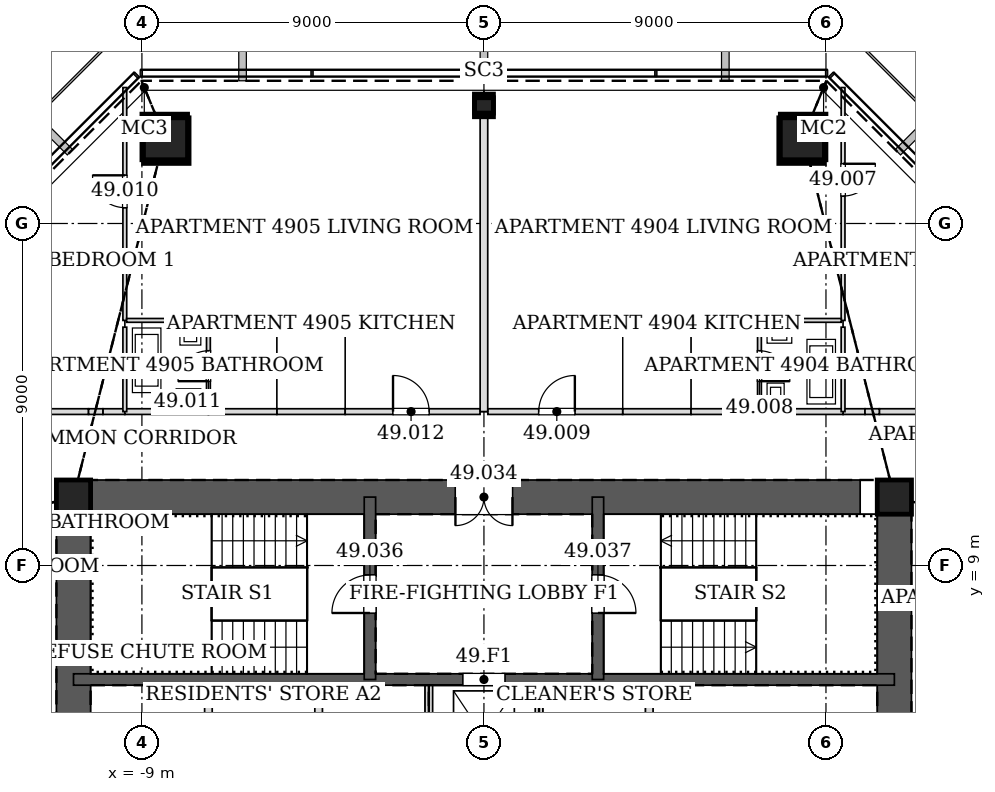
"""IFC4 building model, lengths in metres.
Left out: names, types, materials, properties, quantities, classifications, styles, units other than length and angle.
Written with IfcOpenShell. Run it as: python <this file> out.ifc"""

import sys

from ifc_helpers import new_model, si_unit, direction, frame, frame_2d, origin, origin_2d, place, context, subcontext, project, spatial, rectangle, hollow_rectangle, extrude, element, fill, save


model = new_model("IFC4")
c1 = context("Model", 3, precision=1e-05, world=origin(), true_north=direction((0.0, 1.0)))
c2 = subcontext(c1, "Body", "Model", "MODEL_VIEW")
j1 = project(units=[si_unit("LENGTHUNIT", "METRE"), si_unit("PLANEANGLEUNIT", "RADIAN")], contexts=[c1])
p1 = place(None, origin())
s1 = spatial("IfcSite", under=j1, at=p1, CompositionType="ELEMENT")
p2 = place(p1, origin())
s2 = spatial("IfcBuilding", under=s1, at=p2, CompositionType="ELEMENT")
p3 = place(p2, frame((0.0, 0.0, 214.2)))
s3 = spatial("IfcBuildingStorey", under=s2, at=p3, CompositionType="ELEMENT", Elevation=214.2)
for number, where, z_axis, x_axis in (
    (1, (8.399, 20.277, 0.0), (-0.012, -0.028, 1.0), (0.923, -0.384, 0.0)),
    (2, (-8.399, 20.277, 0.0), (0.012, -0.028, 1.0), (0.923, 0.384, 0.0)),
):
    element("IfcColumn", number, at=place(p3, frame(where, z_axis=z_axis, x_axis=x_axis)), inside=s3, PredefinedType="COLUMN", context=c2, shape_type="SweptSolid", body=[
        extrude(hollow_rectangle(XDim=1.2, YDim=1.2, WallThickness=0.055, at=origin_2d()), origin(), (0.0, 0.0, 1.0), 3.402),
    ])
p4 = place(p3, frame((0.0, 21.155, 0.0), z_axis=(0.0, -0.028279056982, 0.999600067495), x_axis=(1.0, 0.0, 0.0)))
e3 = element("IfcColumn", 3, at=p4, inside=s3, PredefinedType="COLUMN", context=c2, shape_type="SweptSolid", body=[
    extrude(hollow_rectangle(XDim=0.5, YDim=0.5, WallThickness=0.025, at=origin_2d()), origin(), (0.0, 0.0, 1.0), 3.402),
])
for number, where, z_axis, x_axis in (
    (4, (10.8, 10.8, 0.0), (0.0, 0.0, 1.0), (1.0, 0.0, 0.0)),
    (5, (-10.8, 10.8, 0.0), (0.0, 0.0, 1.0), (1.0, 0.0, 0.0)),
):
    element("IfcColumn", number, at=place(p3, frame(where, z_axis=z_axis, x_axis=x_axis)), inside=s3, PredefinedType="COLUMN", context=c2, shape_type="SweptSolid", body=[
        extrude(hollow_rectangle(XDim=0.9, YDim=0.9, WallThickness=0.05, at=origin_2d()), origin(), (0.0, 0.0, 1.0), 3.4),
    ])
p5 = place(p3, frame((10.8, -10.8, 0.0), z_axis=(0.0, 0.0, 1.0), x_axis=(0.0, 1.0, 0.0)))
e6 = element("IfcWall", 6, at=p5, inside=s3, PredefinedType="SOLIDWALL", context=c2, shape_type="SweptSolid", body=[
    extrude(rectangle(XDim=21.6, YDim=0.9, at=frame_2d((10.8, 0.0))), origin(), (0.0, 0.0, 1.0), 3.4),
])
p6 = place(p5, frame((11.7, 0.0, 0.0)))
e7 = element("IfcOpeningElement", 7, at=p6, cuts=e6, PredefinedType="OPENING", context=c2, shape_type="SweptSolid", body=[
    extrude(rectangle(XDim=1.2, YDim=2.1, at=frame_2d((0.6, 1.05))), frame((0.0, 0.46, 0.0), z_axis=(0.0, -1.0, 0.0), x_axis=(1.0, 0.0, 0.0)), (0.0, 0.0, 1.0), 0.92),
])
p7 = place(p5, frame((8.7, 0.0, 0.0)))
e8 = element("IfcOpeningElement", 8, at=p7, cuts=e6, PredefinedType="OPENING", context=c2, shape_type="SweptSolid", body=[
    extrude(rectangle(XDim=1.2, YDim=2.1, at=frame_2d((0.6, 1.05))), frame((0.0, 0.46, 0.0), z_axis=(0.0, -1.0, 0.0), x_axis=(1.0, 0.0, 0.0)), (0.0, 0.0, 1.0), 0.92),
])
p8 = place(p3, frame((10.8, 10.8, 0.0), z_axis=(0.0, 0.0, 1.0), x_axis=(-1.0, 0.0, 0.0)))
e9 = element("IfcWall", 9, at=p8, inside=s3, PredefinedType="SOLIDWALL", context=c2, shape_type="SweptSolid", body=[
    extrude(rectangle(XDim=21.6, YDim=0.9, at=frame_2d((10.8, 0.0))), origin(), (0.0, 0.0, 1.0), 3.4),
])
p9 = place(p8, frame((10.05, 0.0, 0.0)))
e10 = element("IfcOpeningElement", 10, at=p9, cuts=e9, PredefinedType="OPENING", context=c2, shape_type="SweptSolid", body=[
    extrude(rectangle(XDim=1.5, YDim=2.1, at=frame_2d((0.75, 1.05))), frame((0.0, 0.46, 0.0), z_axis=(0.0, -1.0, 0.0), x_axis=(1.0, 0.0, 0.0)), (0.0, 0.0, 1.0), 0.92),
])
p10 = place(p3, frame((-10.8, 10.8, 0.0), z_axis=(0.0, 0.0, 1.0), x_axis=(0.0, -1.0, 0.0)))
e11 = element("IfcWall", 11, at=p10, inside=s3, PredefinedType="SOLIDWALL", context=c2, shape_type="SweptSolid", body=[
    extrude(rectangle(XDim=21.6, YDim=0.9, at=frame_2d((10.8, 0.0))), origin(), (0.0, 0.0, 1.0), 3.4),
])
p11 = place(p10, frame((8.7, 0.0, 0.0)))
e12 = element("IfcOpeningElement", 12, at=p11, cuts=e11, PredefinedType="OPENING", context=c2, shape_type="SweptSolid", body=[
    extrude(rectangle(XDim=1.2, YDim=2.1, at=frame_2d((0.6, 1.05))), frame((0.0, 0.46, 0.0), z_axis=(0.0, -1.0, 0.0), x_axis=(1.0, 0.0, 0.0)), (0.0, 0.0, 1.0), 0.92),
])
p12 = place(p10, frame((11.7, 0.0, 0.0)))
e13 = element("IfcOpeningElement", 13, at=p12, cuts=e11, PredefinedType="OPENING", context=c2, shape_type="SweptSolid", body=[
    extrude(rectangle(XDim=1.2, YDim=2.1, at=frame_2d((0.6, 1.05))), frame((0.0, 0.46, 0.0), z_axis=(0.0, -1.0, 0.0), x_axis=(1.0, 0.0, 0.0)), (0.0, 0.0, 1.0), 0.92),
])
p13 = place(p3, frame((-10.8, 6.0, 0.0), z_axis=(0.0, 0.0, 1.0), x_axis=(1.0, 0.0, 0.0)))
e14 = element("IfcWall", 14, at=p13, inside=s3, PredefinedType="SOLIDWALL", context=c2, shape_type="SweptSolid", body=[
    extrude(rectangle(XDim=21.6, YDim=0.3, at=frame_2d((10.8, 0.0))), origin(), (0.0, 0.0, 1.0), 3.4),
])
p14 = place(p13, frame((10.25, 0.0, 0.0)))
e15 = element("IfcOpeningElement", 15, at=p14, cuts=e14, PredefinedType="OPENING", context=c2, shape_type="SweptSolid", body=[
    extrude(rectangle(XDim=1.1, YDim=2.1, at=frame_2d((0.55, 1.05))), frame((0.0, 0.16, 0.0), z_axis=(0.0, -1.0, 0.0), x_axis=(1.0, 0.0, 0.0)), (0.0, 0.0, 1.0), 0.32),
])
p15 = place(p3, frame((-3.0, 6.0, 0.0), z_axis=(0.0, 0.0, 1.0), x_axis=(0.0, 1.0, 0.0)))
e16 = element("IfcWall", 16, at=p15, inside=s3, PredefinedType="SOLIDWALL", context=c2, shape_type="SweptSolid", body=[
    extrude(rectangle(XDim=4.8, YDim=0.3, at=frame_2d((2.4, 0.0))), origin(), (0.0, 0.0, 1.0), 3.4),
])
p16 = place(p15, frame((1.75, 0.0, 0.0)))
e17 = element("IfcOpeningElement", 17, at=p16, cuts=e16, PredefinedType="OPENING", context=c2, shape_type="SweptSolid", body=[
    extrude(rectangle(XDim=1.0, YDim=2.1, at=frame_2d((0.5, 1.05))), frame((0.0, 0.16, 0.0), z_axis=(0.0, -1.0, 0.0), x_axis=(1.0, 0.0, 0.0)), (0.0, 0.0, 1.0), 0.32),
])
p17 = place(p3, frame((3.0, 6.0, 0.0), z_axis=(0.0, 0.0, 1.0), x_axis=(0.0, 1.0, 0.0)))
e18 = element("IfcWall", 18, at=p17, inside=s3, PredefinedType="SOLIDWALL", context=c2, shape_type="SweptSolid", body=[
    extrude(rectangle(XDim=4.8, YDim=0.3, at=frame_2d((2.4, 0.0))), origin(), (0.0, 0.0, 1.0), 3.4),
])
p18 = place(p17, frame((1.75, 0.0, 0.0)))
e19 = element("IfcOpeningElement", 19, at=p18, cuts=e18, PredefinedType="OPENING", context=c2, shape_type="SweptSolid", body=[
    extrude(rectangle(XDim=1.0, YDim=2.1, at=frame_2d((0.5, 1.05))), frame((0.0, 0.16, 0.0), z_axis=(0.0, -1.0, 0.0), x_axis=(1.0, 0.0, 0.0)), (0.0, 0.0, 1.0), 0.32),
])
p19 = place(p3, frame((13.05, 13.05, 0.0), z_axis=(0.0, 0.0, 1.0), x_axis=(-1.0, 0.0, 0.0)))
e20 = element("IfcWall", 20, at=p19, inside=s3, PredefinedType="PARTITIONING", context=c2, shape_type="SweptSolid", body=[
    extrude(rectangle(XDim=2.646, YDim=0.15, at=frame_2d((1.323, 0.0))), origin(), (0.0, 0.0, 1.0), 2.578),
])
p20 = place(p3, frame((10.027, 13.05, 0.0), z_axis=(0.0, 0.0, 1.0), x_axis=(-1.0, 0.0, 0.0)))
e21 = element("IfcWall", 21, at=p20, inside=s3, PredefinedType="PARTITIONING", context=c2, shape_type="SweptSolid", body=[
    extrude(rectangle(XDim=0.578, YDim=0.15, at=frame_2d((0.289, 0.0))), origin(), (0.0, 0.0, 1.0), 3.2),
])
p21 = place(p3, frame((10.404, 13.05, 0.0), z_axis=(0.0, 0.0, 1.0), x_axis=(-1.0, 0.0, 0.0)))
e22 = element("IfcWall", 22, at=p21, inside=s3, PredefinedType="PARTITIONING", context=c2, shape_type="SweptSolid", body=[
    extrude(rectangle(XDim=0.377, YDim=0.15, at=frame_2d((0.188, 0.0))), origin(), (0.0, 0.0, 1.0), 2.268),
])
p22 = place(p3, frame((9.451, 13.05, 0.0), z_axis=(0.0, 0.0, 1.0), x_axis=(-1.0, 0.0, 0.0)))
e23 = element("IfcWall", 23, at=p22, inside=s3, PredefinedType="PARTITIONING", context=c2, shape_type="SweptSolid", body=[
    extrude(rectangle(XDim=2.202, YDim=0.15, at=frame_2d((1.101, 0.0))), origin(), (0.0, 0.0, 1.0), 3.2),
])
p23 = place(p3, frame((5.451, 13.05, 0.0), z_axis=(0.0, 0.0, 1.0), x_axis=(-1.0, 0.0, 0.0)))
e24 = element("IfcWall", 24, at=p23, inside=s3, PredefinedType="PARTITIONING", context=c2, shape_type="SweptSolid", body=[
    extrude(rectangle(XDim=1.802, YDim=0.15, at=frame_2d((0.901, 0.0))), origin(), (0.0, 0.0, 1.0), 3.2),
])
p24 = place(p3, frame((3.651, 13.05, 0.0), z_axis=(0.0, 0.0, 1.0), x_axis=(-1.0, 0.0, 0.0)))
e25 = element("IfcWall", 25, at=p24, inside=s3, PredefinedType="PARTITIONING", context=c2, shape_type="SweptSolid", body=[
    extrude(rectangle(XDim=3.549, YDim=0.15, at=frame_2d((1.774, 0.0))), origin(), (0.0, 0.0, 1.0), 3.2),
])
p25 = place(p24, frame((1.259, 0.0, 0.0)))
e26 = element("IfcOpeningElement", 26, at=p25, cuts=e25, PredefinedType="OPENING", context=c2, shape_type="SweptSolid", body=[
    extrude(rectangle(XDim=0.95, YDim=2.1, at=frame_2d((0.475, 1.05))), frame((0.0, 0.085, 0.0), z_axis=(0.0, -1.0, 0.0), x_axis=(1.0, 0.0, 0.0)), (0.0, 0.0, 1.0), 0.17),
])
p26 = place(p3, frame((7.251, 13.05, 0.0), z_axis=(0.0, 0.0, 1.0), x_axis=(-1.0, 0.0, 0.0)))
e27 = element("IfcWall", 27, at=p26, inside=s3, PredefinedType="PARTITIONING", context=c2, shape_type="SweptSolid", body=[
    extrude(rectangle(XDim=1.802, YDim=0.15, at=frame_2d((0.901, 0.0))), origin(), (0.0, 0.0, 1.0), 3.2),
])
p27 = place(p3, frame((-9.449, 13.05, 0.0), z_axis=(0.0, 0.0, 1.0), x_axis=(-1.0, 0.0, 0.0)))
e28 = element("IfcWall", 28, at=p27, inside=s3, PredefinedType="PARTITIONING", context=c2, shape_type="SweptSolid", body=[
    extrude(rectangle(XDim=0.578, YDim=0.15, at=frame_2d((0.289, 0.0))), origin(), (0.0, 0.0, 1.0), 3.2),
])
p28 = place(p3, frame((-10.404, 13.05, 0.0), z_axis=(0.0, 0.0, 1.0), x_axis=(-1.0, 0.0, 0.0)))
e29 = element("IfcWall", 29, at=p28, inside=s3, PredefinedType="PARTITIONING", context=c2, shape_type="SweptSolid", body=[
    extrude(rectangle(XDim=2.646, YDim=0.15, at=frame_2d((1.323, 0.0))), origin(), (0.0, 0.0, 1.0), 2.578),
])
p29 = place(p3, frame((-10.027, 13.05, 0.0), z_axis=(0.0, 0.0, 1.0), x_axis=(-1.0, 0.0, 0.0)))
e30 = element("IfcWall", 30, at=p29, inside=s3, PredefinedType="PARTITIONING", context=c2, shape_type="SweptSolid", body=[
    extrude(rectangle(XDim=0.377, YDim=0.15, at=frame_2d((0.188, 0.0))), origin(), (0.0, 0.0, 1.0), 2.268),
])
p30 = place(p3, frame((-7.249, 13.05, 0.0), z_axis=(0.0, 0.0, 1.0), x_axis=(-1.0, 0.0, 0.0)))
e31 = element("IfcWall", 31, at=p30, inside=s3, PredefinedType="PARTITIONING", context=c2, shape_type="SweptSolid", body=[
    extrude(rectangle(XDim=2.202, YDim=0.15, at=frame_2d((1.101, 0.0))), origin(), (0.0, 0.0, 1.0), 3.2),
])
for number, where, z_axis, x_axis in (
    (32, (-3.649, 13.05, 0.0), (0.0, 0.0, 1.0), (-1.0, 0.0, 0.0)),
    (33, (-5.449, 13.05, 0.0), (0.0, 0.0, 1.0), (-1.0, 0.0, 0.0)),
):
    element("IfcWall", number, at=place(p3, frame(where, z_axis=z_axis, x_axis=x_axis)), inside=s3, PredefinedType="PARTITIONING", context=c2, shape_type="SweptSolid", body=[
        extrude(rectangle(XDim=1.802, YDim=0.15, at=frame_2d((0.901, 0.0))), origin(), (0.0, 0.0, 1.0), 3.2),
    ])
p31 = place(p3, frame((-0.102, 13.05, 0.0), z_axis=(0.0, 0.0, 1.0), x_axis=(-1.0, 0.0, 0.0)))
e34 = element("IfcWall", 34, at=p31, inside=s3, PredefinedType="PARTITIONING", context=c2, shape_type="SweptSolid", body=[
    extrude(rectangle(XDim=3.549, YDim=0.15, at=frame_2d((1.774, 0.0))), origin(), (0.0, 0.0, 1.0), 3.2),
])
p32 = place(p31, frame((1.34, 0.0, 0.0)))
e35 = element("IfcOpeningElement", 35, at=p32, cuts=e34, PredefinedType="OPENING", context=c2, shape_type="SweptSolid", body=[
    extrude(rectangle(XDim=0.95, YDim=2.1, at=frame_2d((0.475, 1.05))), frame((0.0, 0.085, 0.0), z_axis=(0.0, -1.0, 0.0), x_axis=(1.0, 0.0, 0.0)), (0.0, 0.0, 1.0), 0.17),
])
p33 = place(p3, frame((9.45, 15.271, 0.0), z_axis=(0.0, 0.0, 1.0), x_axis=(0.0, -1.0, 0.0)))
e36 = element("IfcWall", 36, at=p33, inside=s3, PredefinedType="PARTITIONING", context=c2, shape_type="SweptSolid", body=[
    extrude(rectangle(XDim=2.221, YDim=0.1, at=frame_2d((1.111, 0.0))), origin(), (0.0, 0.0, 1.0), 2.591),
])
p34 = place(p3, frame((9.45, 21.578, 0.0), z_axis=(0.0, 0.0, 1.0), x_axis=(0.0, -1.0, 0.0)))
e37 = element("IfcWall", 37, at=p34, inside=s3, PredefinedType="PARTITIONING", context=c2, shape_type="SweptSolid", body=[
    extrude(rectangle(XDim=4.855, YDim=0.1, at=frame_2d((2.428, 0.0))), origin(), (0.0, 0.0, 1.0), 2.784),
])
p35 = place(p34, frame((2.006, 0.0, 0.0)))
e38 = element("IfcOpeningElement", 38, at=p35, cuts=e37, PredefinedType="OPENING", context=c2, shape_type="SweptSolid", body=[
    extrude(rectangle(XDim=0.85, YDim=2.1, at=frame_2d((0.425, 1.05))), frame((0.0, 0.06, 0.0), z_axis=(0.0, -1.0, 0.0), x_axis=(1.0, 0.0, 0.0)), (0.0, 0.0, 1.0), 0.12),
])
p36 = place(p3, frame((9.45, 16.722, 0.0), z_axis=(0.0, 0.0, 1.0), x_axis=(0.0, -1.0, 0.0)))
e39 = element("IfcWall", 39, at=p36, inside=s3, PredefinedType="PARTITIONING", context=c2, shape_type="SweptSolid", body=[
    extrude(rectangle(XDim=1.273, YDim=0.1, at=frame_2d((0.637, 0.0))), origin(), (0.0, 0.0, 1.0), 2.268),
])
p37 = place(p3, frame((9.404, 15.45, 0.0), z_axis=(0.0, 0.0, 1.0), x_axis=(-1.0, 0.0, 0.0)))
e40 = element("IfcWall", 40, at=p37, inside=s3, PredefinedType="PARTITIONING", context=c2, shape_type="SweptSolid", body=[
    extrude(rectangle(XDim=2.154, YDim=0.1, at=frame_2d((1.077, 0.0))), origin(), (0.0, 0.0, 1.0), 3.2),
])
p38 = place(p3, frame((7.25, 15.45, 0.0), z_axis=(0.0, 0.0, 1.0), x_axis=(0.0, -1.0, 0.0)))
e41 = element("IfcWall", 41, at=p38, inside=s3, PredefinedType="PARTITIONING", context=c2, shape_type="SweptSolid", body=[
    extrude(rectangle(XDim=2.4, YDim=0.1, at=frame_2d((1.2, 0.0))), origin(), (0.0, 0.0, 1.0), 2.591),
])
p39 = place(p38, frame((0.8, 0.0, 0.0)))
e42 = element("IfcOpeningElement", 42, at=p39, cuts=e41, PredefinedType="OPENING", context=c2, shape_type="SweptSolid", body=[
    extrude(rectangle(XDim=0.8, YDim=2.1, at=frame_2d((0.4, 1.05))), frame((0.0, 0.06, 0.0), z_axis=(0.0, -1.0, 0.0), x_axis=(1.0, 0.0, 0.0)), (0.0, 0.0, 1.0), 0.12),
])
p40 = place(p3, frame((0.0, 20.79, 0.0), z_axis=(0.0, 0.0, 1.0), x_axis=(0.0, -1.0, 0.0)))
e43 = element("IfcWall", 43, at=p40, inside=s3, PredefinedType="PARTITIONING", context=c2, shape_type="SweptSolid", body=[
    extrude(rectangle(XDim=7.74, YDim=0.2, at=frame_2d((3.87, 0.0))), origin(), (0.0, 0.0, 1.0), 2.253),
])
p41 = place(p3, frame((-9.45, 13.05, 0.0), z_axis=(0.0, 0.0, 1.0), x_axis=(0.0, 1.0, 0.0)))
e44 = element("IfcWall", 44, at=p41, inside=s3, PredefinedType="PARTITIONING", context=c2, shape_type="SweptSolid", body=[
    extrude(rectangle(XDim=2.221, YDim=0.1, at=frame_2d((1.111, 0.0))), origin(), (0.0, 0.0, 1.0), 2.591),
])
p42 = place(p3, frame((-9.45, 16.722, 0.0), z_axis=(0.0, 0.0, 1.0), x_axis=(0.0, 1.0, 0.0)))
e45 = element("IfcWall", 45, at=p42, inside=s3, PredefinedType="PARTITIONING", context=c2, shape_type="SweptSolid", body=[
    extrude(rectangle(XDim=4.855, YDim=0.1, at=frame_2d((2.428, 0.0))), origin(), (0.0, 0.0, 1.0), 2.784),
])
p43 = place(p42, frame((1.695, 0.0, 0.0)))
e46 = element("IfcOpeningElement", 46, at=p43, cuts=e45, PredefinedType="OPENING", context=c2, shape_type="SweptSolid", body=[
    extrude(rectangle(XDim=0.85, YDim=2.1, at=frame_2d((0.425, 1.05))), frame((0.0, 0.06, 0.0), z_axis=(0.0, -1.0, 0.0), x_axis=(1.0, 0.0, 0.0)), (0.0, 0.0, 1.0), 0.12),
])
p44 = place(p3, frame((-9.45, 15.449, 0.0), z_axis=(0.0, 0.0, 1.0), x_axis=(0.0, 1.0, 0.0)))
e47 = element("IfcWall", 47, at=p44, inside=s3, PredefinedType="PARTITIONING", context=c2, shape_type="SweptSolid", body=[
    extrude(rectangle(XDim=1.273, YDim=0.1, at=frame_2d((0.637, 0.0))), origin(), (0.0, 0.0, 1.0), 2.268),
])
p45 = place(p3, frame((-7.25, 13.05, 0.0), z_axis=(0.0, 0.0, 1.0), x_axis=(0.0, 1.0, 0.0)))
e48 = element("IfcWall", 48, at=p45, inside=s3, PredefinedType="PARTITIONING", context=c2, shape_type="SweptSolid", body=[
    extrude(rectangle(XDim=2.4, YDim=0.1, at=frame_2d((1.2, 0.0))), origin(), (0.0, 0.0, 1.0), 2.591),
])
p46 = place(p45, frame((0.8, 0.0, 0.0)))
e49 = element("IfcOpeningElement", 49, at=p46, cuts=e48, PredefinedType="OPENING", context=c2, shape_type="SweptSolid", body=[
    extrude(rectangle(XDim=0.8, YDim=2.1, at=frame_2d((0.4, 1.05))), frame((0.0, 0.06, 0.0), z_axis=(0.0, -1.0, 0.0), x_axis=(1.0, 0.0, 0.0)), (0.0, 0.0, 1.0), 0.12),
])
p47 = place(p3, frame((-7.25, 15.45, 0.0), z_axis=(0.0, 0.0, 1.0), x_axis=(-1.0, 0.0, 0.0)))
e50 = element("IfcWall", 50, at=p47, inside=s3, PredefinedType="PARTITIONING", context=c2, shape_type="SweptSolid", body=[
    extrude(rectangle(XDim=2.154, YDim=0.1, at=frame_2d((1.077, 0.0))), origin(), (0.0, 0.0, 1.0), 3.2),
])
for number, where, z_axis, x_axis in (
    (51, (-7.25, 3.15, 0.0), (0.0, 0.0, 1.0), (0.0, 1.0, 0.0)),
    (52, (-4.35, 3.15, 0.0), (0.0, 0.0, 1.0), (0.0, 1.0, 0.0)),
    (53, (-1.45, 3.15, 0.0), (0.0, 0.0, 1.0), (0.0, 1.0, 0.0)),
    (54, (1.45, 3.15, 0.0), (0.0, 0.0, 1.0), (0.0, 1.0, 0.0)),
    (55, (4.35, 3.15, 0.0), (0.0, 0.0, 1.0), (0.0, 1.0, 0.0)),
):
    element("IfcWall", number, at=place(p3, frame(where, z_axis=z_axis, x_axis=x_axis)), inside=s3, PredefinedType="PARTITIONING", context=c2, shape_type="SweptSolid", body=[
        extrude(rectangle(XDim=2.7, YDim=0.2, at=frame_2d((1.35, 0.0))), origin(), (0.0, 0.0, 1.0), 3.2),
    ])
p48 = place(p35, origin())
e56 = element("IfcDoor", 56, at=p48, inside=s3, OperationType="SINGLE_SWING_LEFT", PredefinedType="DOOR", context=c2, shape_type="SweptSolid", body=[
    extrude(rectangle(XDim=0.85, YDim=2.1, at=frame_2d((0.425, 1.05))), frame((0.0, 0.025, 0.0), z_axis=(0.0, -1.0, 0.0), x_axis=(1.0, 0.0, 0.0)), (0.0, 0.0, 1.0), 0.05),
])
fill(e38, e56)
p49 = place(p39, origin())
e57 = element("IfcDoor", 57, at=p49, inside=s3, OperationType="SINGLE_SWING_RIGHT", PredefinedType="DOOR", context=c2, shape_type="SweptSolid", body=[
    extrude(rectangle(XDim=0.8, YDim=2.1, at=frame_2d((0.4, 1.05))), frame((0.0, 0.025, 0.0), z_axis=(0.0, -1.0, 0.0), x_axis=(1.0, 0.0, 0.0)), (0.0, 0.0, 1.0), 0.05),
])
fill(e42, e57)
p50 = place(p25, frame((0.95, 0.0, 0.0), z_axis=(0.0, 0.0, 1.0), x_axis=(-1.0, 0.0, 0.0)))
e58 = element("IfcDoor", 58, at=p50, inside=s3, OperationType="SINGLE_SWING_RIGHT", PredefinedType="DOOR", context=c2, shape_type="SweptSolid", body=[
    extrude(rectangle(XDim=0.95, YDim=2.1, at=frame_2d((0.475, 1.05))), frame((0.0, 0.025, 0.0), z_axis=(0.0, -1.0, 0.0), x_axis=(1.0, 0.0, 0.0)), (0.0, 0.0, 1.0), 0.05),
])
fill(e26, e58)
p51 = place(p43, origin())
e59 = element("IfcDoor", 59, at=p51, inside=s3, OperationType="SINGLE_SWING_RIGHT", PredefinedType="DOOR", context=c2, shape_type="SweptSolid", body=[
    extrude(rectangle(XDim=0.85, YDim=2.1, at=frame_2d((0.425, 1.05))), frame((0.0, 0.025, 0.0), z_axis=(0.0, -1.0, 0.0), x_axis=(1.0, 0.0, 0.0)), (0.0, 0.0, 1.0), 0.05),
])
fill(e46, e59)
p52 = place(p46, origin())
e60 = element("IfcDoor", 60, at=p52, inside=s3, OperationType="SINGLE_SWING_LEFT", PredefinedType="DOOR", context=c2, shape_type="SweptSolid", body=[
    extrude(rectangle(XDim=0.8, YDim=2.1, at=frame_2d((0.4, 1.05))), frame((0.0, 0.025, 0.0), z_axis=(0.0, -1.0, 0.0), x_axis=(1.0, 0.0, 0.0)), (0.0, 0.0, 1.0), 0.05),
])
fill(e49, e60)
p53 = place(p32, frame((0.95, 0.0, 0.0), z_axis=(0.0, 0.0, 1.0), x_axis=(-1.0, 0.0, 0.0)))
e61 = element("IfcDoor", 61, at=p53, inside=s3, OperationType="SINGLE_SWING_LEFT", PredefinedType="DOOR", context=c2, shape_type="SweptSolid", body=[
    extrude(rectangle(XDim=0.95, YDim=2.1, at=frame_2d((0.475, 1.05))), frame((0.0, 0.025, 0.0), z_axis=(0.0, -1.0, 0.0), x_axis=(1.0, 0.0, 0.0)), (0.0, 0.0, 1.0), 0.05),
])
fill(e35, e61)
p54 = place(p9, origin())
e62 = element("IfcDoor", 62, at=p54, inside=s3, OperationType="DOUBLE_DOOR_SINGLE_SWING", PredefinedType="DOOR", context=c2, shape_type="SweptSolid", body=[
    extrude(rectangle(XDim=1.5, YDim=2.1, at=frame_2d((0.75, 1.05))), frame((0.0, 0.025, 0.0), z_axis=(0.0, -1.0, 0.0), x_axis=(1.0, 0.0, 0.0)), (0.0, 0.0, 1.0), 0.05),
])
fill(e10, e62)
p55 = place(p16, origin())
e63 = element("IfcDoor", 63, at=p55, inside=s3, OperationType="SINGLE_SWING_LEFT", PredefinedType="DOOR", context=c2, shape_type="SweptSolid", body=[
    extrude(rectangle(XDim=1.0, YDim=2.1, at=frame_2d((0.5, 1.05))), frame((0.0, 0.025, 0.0), z_axis=(0.0, -1.0, 0.0), x_axis=(1.0, 0.0, 0.0)), (0.0, 0.0, 1.0), 0.05),
])
fill(e17, e63)
p56 = place(p18, frame((1.0, 0.0, 0.0), z_axis=(0.0, 0.0, 1.0), x_axis=(-1.0, 0.0, 0.0)))
e64 = element("IfcDoor", 64, at=p56, inside=s3, OperationType="SINGLE_SWING_RIGHT", PredefinedType="DOOR", context=c2, shape_type="SweptSolid", body=[
    extrude(rectangle(XDim=1.0, YDim=2.1, at=frame_2d((0.5, 1.05))), frame((0.0, 0.025, 0.0), z_axis=(0.0, -1.0, 0.0), x_axis=(1.0, 0.0, 0.0)), (0.0, 0.0, 1.0), 0.05),
])
fill(e19, e64)
p57 = place(p14, origin())
e65 = element("IfcDoor", 65, at=p57, inside=s3, OperationType="DOUBLE_DOOR_SLIDING", PredefinedType="DOOR", context=c2, shape_type="SweptSolid", body=[
    extrude(rectangle(XDim=1.1, YDim=2.1, at=frame_2d((0.55, 1.05))), frame((0.0, 0.025, 0.0), z_axis=(0.0, -1.0, 0.0), x_axis=(1.0, 0.0, 0.0)), (0.0, 0.0, 1.0), 0.05),
])
fill(e15, e65)
save(model, sys.argv[1])
